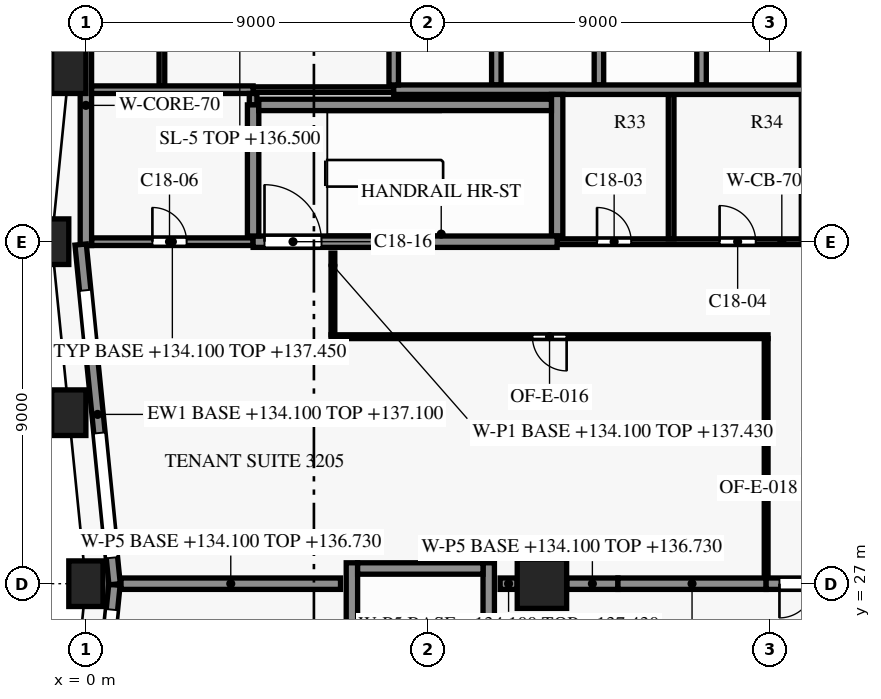
"""IFC4 building model, lengths in metres.
Left out: names, types, materials, properties, quantities, classifications, styles, units other than length and angle.
Written with IfcOpenShell. Run it as: python <this file> out.ifc"""

import sys

from ifc_helpers import new_model, si_unit, direction, frame, frame_2d, origin, origin_2d, place, context, subcontext, project, spatial, rectangle, extrude, element, fill, save


model = new_model("IFC4")
c1 = context("Model", 3, precision=1e-05, world=origin(), true_north=direction((0.0, 1.0)))
c2 = subcontext(c1, "Body", "Model", "MODEL_VIEW")
j1 = project(units=[si_unit("LENGTHUNIT", "METRE"), si_unit("PLANEANGLEUNIT", "RADIAN")], contexts=[c1])
p1 = place(None, origin())
s1 = spatial("IfcSite", under=j1, at=p1, CompositionType="ELEMENT")
p2 = place(p1, origin())
s2 = spatial("IfcBuilding", under=s1, at=p2, CompositionType="ELEMENT")
p3 = place(p2, frame((0.0, 0.0, 134.1)))
s3 = spatial("IfcBuildingStorey", under=s2, at=p3, CompositionType="ELEMENT", Elevation=134.1)
for number, where, z_axis, x_axis in (
    (1, (-0.45, 40.5, 0.0), (0.0, 0.0, 1.0), (-0.1, -0.995, 0.0)),
    (2, (-0.9, 36.0, 0.0), (0.0, 0.0, 1.0), (0.0, -1.0, 0.0)),
    (3, (-0.45, 31.5, 0.0), (0.0, 0.0, 1.0), (0.1, -0.995, 0.0)),
    (4, (0.0, 27.0, 0.0), (0.0, 0.0, 1.0), (0.0, -1.0, 0.0)),
):
    element("IfcColumn", number, at=place(p3, frame(where, z_axis=z_axis, x_axis=x_axis)), inside=s3, PredefinedType="COLUMN", context=c2, shape_type="SweptSolid", body=[
        extrude(rectangle(XDim=0.9, YDim=1.2, at=origin_2d()), origin(), (0.0, 0.0, 1.0), 3.8),
    ])
p4 = place(p3, frame((12.0, 27.0, 0.0), z_axis=(0.0, 0.0, 1.0), x_axis=(1.0, 0.0, 0.0)))
e5 = element("IfcColumn", 5, at=p4, inside=s3, PredefinedType="COLUMN", context=c2, shape_type="SweptSolid", body=[
    extrude(rectangle(XDim=1.3, YDim=1.3, at=origin_2d()), origin(), (0.0, 0.0, 1.0), 3.8),
])
p5 = place(p3, frame((0.755, 26.985, 0.0), z_axis=(0.0, 0.0, 1.0), x_axis=(-0.099479505633, 0.995039611251, 0.0)))
e6 = element("IfcWall", 6, at=p5, inside=s3, PredefinedType="SOLIDWALL", context=c2, shape_type="SweptSolid", body=[
    extrude(rectangle(XDim=8.985, YDim=0.3, at=frame_2d((4.492, 0.0))), origin(), (0.0, 0.0, 1.0), 3.0),
])
p6 = place(p5, frame((0.701, 0.0, 0.15)))
e7 = element("IfcOpeningElement", 7, at=p6, cuts=e6, PredefinedType="OPENING", context=c2, shape_type="SweptSolid", body=[
    extrude(rectangle(XDim=3.3, YDim=2.4, at=frame_2d((1.65, 1.2))), frame((0.0, 0.16, 0.0), z_axis=(0.0, -1.0, 0.0), x_axis=(1.0, 0.0, 0.0)), (0.0, 0.0, 1.0), 0.32),
])
p7 = place(p5, frame((5.974, 0.0, 0.75)))
e8 = element("IfcOpeningElement", 8, at=p7, cuts=e6, PredefinedType="OPENING", context=c2, shape_type="SweptSolid", body=[
    extrude(rectangle(XDim=1.8, YDim=1.8, at=frame_2d((0.9, 0.9))), frame((0.0, 0.16, 0.0), z_axis=(0.0, -1.0, 0.0), x_axis=(1.0, 0.0, 0.0)), (0.0, 0.0, 1.0), 0.32),
])
p8 = place(p3, frame((-0.148, 17.985, 0.0), z_axis=(0.0, 0.0, 1.0), x_axis=(0.099495688264, 0.995037993253, 0.0)))
e9 = element("IfcWall", 9, at=p8, inside=s3, PredefinedType="SOLIDWALL", context=c2, shape_type="SweptSolid", body=[
    extrude(rectangle(XDim=9.03, YDim=0.3, at=frame_2d((4.515, 0.0))), origin(), (0.0, 0.0, 1.0), 3.0),
])
p9 = place(p8, frame((1.301, 0.0, 0.75)))
e10 = element("IfcOpeningElement", 10, at=p9, cuts=e9, PredefinedType="OPENING", context=c2, shape_type="SweptSolid", body=[
    extrude(rectangle(XDim=1.8, YDim=1.8, at=frame_2d((0.9, 0.9))), frame((0.0, 0.16, 0.0), z_axis=(0.0, -1.0, 0.0), x_axis=(1.0, 0.0, 0.0)), (0.0, 0.0, 1.0), 0.32),
])
p10 = place(p8, frame((5.073, 0.0, 0.15)))
e11 = element("IfcOpeningElement", 11, at=p10, cuts=e9, PredefinedType="OPENING", context=c2, shape_type="SweptSolid", body=[
    extrude(rectangle(XDim=3.3, YDim=2.4, at=frame_2d((1.65, 1.2))), frame((0.0, 0.16, 0.0), z_axis=(0.0, -1.0, 0.0), x_axis=(1.0, 0.0, 0.0)), (0.0, 0.0, 1.0), 0.32),
])
p11 = place(p3, frame((7.15, 27.4, 0.0), z_axis=(0.0, 0.0, 1.0), x_axis=(1.0, 0.0, 0.0)))
e12 = element("IfcWall", 12, at=p11, inside=s3, PredefinedType="SHEAR", context=c2, shape_type="SweptSolid", body=[
    extrude(rectangle(XDim=3.3, YDim=0.3, at=frame_2d((1.65, 0.0))), origin(), (0.0, 0.0, 1.0), 3.5),
])
p12 = place(p3, frame((12.4, 36.0, 0.0), z_axis=(0.0, 0.0, 1.0), x_axis=(1.0, 0.0, 0.0)))
e13 = element("IfcWall", 13, at=p12, inside=s3, PredefinedType="SHEAR", context=c2, shape_type="SweptSolid", body=[
    extrude(rectangle(XDim=11.825, YDim=0.15, at=frame_2d((5.913, 0.0))), origin(), (0.0, 0.0, 1.0), 3.5),
])
p13 = place(p12, frame((1.05, 0.0, 0.0)))
e14 = element("IfcOpeningElement", 14, at=p13, cuts=e13, PredefinedType="OPENING", context=c2, shape_type="SweptSolid", body=[
    extrude(rectangle(XDim=0.9, YDim=2.1, at=frame_2d((0.45, 1.05))), frame((0.0, 0.085, 0.0), z_axis=(0.0, -1.0, 0.0), x_axis=(1.0, 0.0, 0.0)), (0.0, 0.0, 1.0), 0.17),
])
p14 = place(p12, frame((4.275, 0.0, 0.0)))
e15 = element("IfcOpeningElement", 15, at=p14, cuts=e13, PredefinedType="OPENING", context=c2, shape_type="SweptSolid", body=[
    extrude(rectangle(XDim=0.95, YDim=2.1, at=frame_2d((0.475, 1.05))), frame((0.0, 0.085, 0.0), z_axis=(0.0, -1.0, 0.0), x_axis=(1.0, 0.0, 0.0)), (0.0, 0.0, 1.0), 0.17),
])
p15 = place(p12, frame((8.75, 0.0, 0.0)))
e16 = element("IfcOpeningElement", 16, at=p15, cuts=e13, PredefinedType="OPENING", context=c2, shape_type="SweptSolid", body=[
    extrude(rectangle(XDim=0.9, YDim=2.1, at=frame_2d((0.45, 1.05))), frame((0.0, 0.085, 0.0), z_axis=(0.0, -1.0, 0.0), x_axis=(1.0, 0.0, 0.0)), (0.0, 0.0, 1.0), 0.17),
])
p16 = place(p3, frame((0.15, 36.0, 0.0), z_axis=(0.0, 0.0, 1.0), x_axis=(1.0, 0.0, 0.0)))
e17 = element("IfcWall", 17, at=p16, inside=s3, PredefinedType="PARTITIONING", context=c2, shape_type="SweptSolid", body=[
    extrude(rectangle(XDim=4.25, YDim=0.2, at=frame_2d((2.125, 0.0))), origin(), (0.0, 0.0, 1.0), 3.35),
])
p17 = place(p16, frame((1.6, 0.0, 0.0)))
e18 = element("IfcOpeningElement", 18, at=p17, cuts=e17, PredefinedType="OPENING", context=c2, shape_type="SweptSolid", body=[
    extrude(rectangle(XDim=0.9, YDim=2.1, at=frame_2d((0.45, 1.05))), frame((0.0, 0.11, 0.0), z_axis=(0.0, -1.0, 0.0), x_axis=(1.0, 0.0, 0.0)), (0.0, 0.0, 1.0), 0.22),
])
p18 = place(p3, frame((4.4, 36.0, 0.0), z_axis=(0.0, 0.0, 1.0), x_axis=(1.0, 0.0, 0.0)))
e19 = element("IfcWall", 19, at=p18, inside=s3, PredefinedType="SHEAR", context=c2, shape_type="SweptSolid", body=[
    extrude(rectangle(XDim=8.0, YDim=0.3, at=frame_2d((4.0, 0.0))), origin(), (0.0, 0.0, 1.0), 3.5),
])
p19 = place(p18, frame((0.3, 0.0, 0.0)))
e20 = element("IfcOpeningElement", 20, at=p19, cuts=e19, PredefinedType="OPENING", context=c2, shape_type="SweptSolid", body=[
    extrude(rectangle(XDim=1.5, YDim=2.2, at=frame_2d((0.75, 1.1))), frame((0.0, 0.16, 0.0), z_axis=(0.0, -1.0, 0.0), x_axis=(1.0, 0.0, 0.0)), (0.0, 0.0, 1.0), 0.32),
])
p20 = place(p3, frame((4.55, 39.6, 0.0), z_axis=(0.0, 0.0, 1.0), x_axis=(1.0, 0.0, 0.0)))
e21 = element("IfcWall", 21, at=p20, inside=s3, PredefinedType="SHEAR", context=c2, shape_type="SweptSolid", body=[
    extrude(rectangle(XDim=7.7, YDim=0.3, at=frame_2d((3.85, 0.0))), origin(), (0.0, 0.0, 1.0), 3.5),
])
p21 = place(p3, frame((4.4, 40.0, 0.0), z_axis=(0.0, 0.0, 1.0), x_axis=(1.0, 0.0, 0.0)))
e22 = element("IfcWall", 22, at=p21, inside=s3, PredefinedType="PARTITIONING", context=c2, shape_type="SweptSolid", body=[
    extrude(rectangle(XDim=3.7, YDim=0.15, at=frame_2d((1.85, 0.0))), origin(), (0.0, 0.0, 1.0), 3.35),
])
p22 = place(p3, frame((0.15, 40.0, 0.0), z_axis=(0.0, 0.0, 1.0), x_axis=(1.0, 0.0, 0.0)))
e23 = element("IfcWall", 23, at=p22, inside=s3, PredefinedType="PARTITIONING", context=c2, shape_type="SweptSolid", body=[
    extrude(rectangle(XDim=4.25, YDim=0.2, at=frame_2d((2.125, 0.0))), origin(), (0.0, 0.0, 1.0), 3.35),
])
p23 = place(p3, frame((8.1, 40.0, 0.0), z_axis=(0.0, 0.0, 1.0), x_axis=(1.0, 0.0, 0.0)))
e24 = element("IfcWall", 24, at=p23, inside=s3, PredefinedType="SHEAR", context=c2, shape_type="SweptSolid", body=[
    extrude(rectangle(XDim=13.5, YDim=0.25, at=frame_2d((6.75, 0.0))), origin(), (0.0, 0.0, 1.0), 3.5),
])
p24 = place(p3, frame((0.0, 35.9, 0.0), z_axis=(0.0, 0.0, 1.0), x_axis=(0.0, 1.0, 0.0)))
e25 = element("IfcWall", 25, at=p24, inside=s3, PredefinedType="SHEAR", context=c2, shape_type="SweptSolid", body=[
    extrude(rectangle(XDim=7.375, YDim=0.3, at=frame_2d((3.688, 0.0))), origin(), (0.0, 0.0, 1.0), 3.5),
])
p25 = place(p3, frame((2.0, 40.1, 0.0), z_axis=(0.0, 0.0, 1.0), x_axis=(0.0, 1.0, 0.0)))
e26 = element("IfcWall", 26, at=p25, inside=s3, PredefinedType="PARTITIONING", context=c2, shape_type="SweptSolid", body=[
    extrude(rectangle(XDim=3.025, YDim=0.15, at=frame_2d((1.512, 0.0))), origin(), (0.0, 0.0, 1.0), 3.35),
])
p26 = place(p3, frame((4.4, 39.6, 0.0), z_axis=(0.0, 0.0, 1.0), x_axis=(0.0, 1.0, 0.0)))
e27 = element("IfcWall", 27, at=p26, inside=s3, PredefinedType="PARTITIONING", context=c2, shape_type="SweptSolid", body=[
    extrude(rectangle(XDim=0.3, YDim=0.2, at=frame_2d((0.15, 0.0))), origin(), (0.0, 0.0, 1.0), 3.35),
])
p27 = place(p3, frame((4.4, 36.15, 0.0), z_axis=(0.0, 0.0, 1.0), x_axis=(0.0, 1.0, 0.0)))
e28 = element("IfcWall", 28, at=p27, inside=s3, PredefinedType="SHEAR", context=c2, shape_type="SweptSolid", body=[
    extrude(rectangle(XDim=3.45, YDim=0.3, at=frame_2d((1.725, 0.0))), origin(), (0.0, 0.0, 1.0), 3.5),
])
p28 = place(p3, frame((7.0, 19.25, 0.0), z_axis=(0.0, 0.0, 1.0), x_axis=(0.0, 1.0, 0.0)))
e29 = element("IfcWall", 29, at=p28, inside=s3, PredefinedType="SHEAR", context=c2, shape_type="SweptSolid", body=[
    extrude(rectangle(XDim=8.3, YDim=0.3, at=frame_2d((4.15, 0.0))), origin(), (0.0, 0.0, 1.0), 3.5),
])
p29 = place(p3, frame((8.1, 40.125, 0.0), z_axis=(0.0, 0.0, 1.0), x_axis=(0.0, 1.0, 0.0)))
e30 = element("IfcWall", 30, at=p29, inside=s3, PredefinedType="SHEAR", context=c2, shape_type="SweptSolid", body=[
    extrude(rectangle(XDim=2.95, YDim=0.25, at=frame_2d((1.475, 0.0))), origin(), (0.0, 0.0, 1.0), 3.5),
])
p30 = place(p3, frame((10.6, 19.25, 0.0), z_axis=(0.0, 0.0, 1.0), x_axis=(0.0, 1.0, 0.0)))
e31 = element("IfcWall", 31, at=p30, inside=s3, PredefinedType="SHEAR", context=c2, shape_type="SweptSolid", body=[
    extrude(rectangle(XDim=8.3, YDim=0.3, at=frame_2d((4.15, 0.0))), origin(), (0.0, 0.0, 1.0), 3.5),
])
p31 = place(p30, frame((0.55, 0.0, 0.0)))
e32 = element("IfcOpeningElement", 32, at=p31, cuts=e31, PredefinedType="OPENING", context=c2, shape_type="SweptSolid", body=[
    extrude(rectangle(XDim=1.2, YDim=2.2, at=frame_2d((0.6, 1.1))), frame((0.0, 0.16, 0.0), z_axis=(0.0, -1.0, 0.0), x_axis=(1.0, 0.0, 0.0)), (0.0, 0.0, 1.0), 0.32),
])
p32 = place(p3, frame((10.8, 40.125, 0.0), z_axis=(0.0, 0.0, 1.0), x_axis=(0.0, 1.0, 0.0)))
e33 = element("IfcWall", 33, at=p32, inside=s3, PredefinedType="SHEAR", context=c2, shape_type="SweptSolid", body=[
    extrude(rectangle(XDim=2.95, YDim=0.25, at=frame_2d((1.475, 0.0))), origin(), (0.0, 0.0, 1.0), 3.5),
])
p33 = place(p3, frame((12.4, 36.15, 0.0), z_axis=(0.0, 0.0, 1.0), x_axis=(0.0, 1.0, 0.0)))
e34 = element("IfcWall", 34, at=p33, inside=s3, PredefinedType="SHEAR", context=c2, shape_type="SweptSolid", body=[
    extrude(rectangle(XDim=3.725, YDim=0.3, at=frame_2d((1.863, 0.0))), origin(), (0.0, 0.0, 1.0), 3.5),
])
p34 = place(p3, frame((13.5, 40.125, 0.0), z_axis=(0.0, 0.0, 1.0), x_axis=(0.0, 1.0, 0.0)))
e35 = element("IfcWall", 35, at=p34, inside=s3, PredefinedType="SHEAR", context=c2, shape_type="SweptSolid", body=[
    extrude(rectangle(XDim=2.95, YDim=0.25, at=frame_2d((1.475, 0.0))), origin(), (0.0, 0.0, 1.0), 3.5),
])
p35 = place(p3, frame((15.4, 36.075, 0.0), z_axis=(0.0, 0.0, 1.0), x_axis=(0.0, 1.0, 0.0)))
e36 = element("IfcWall", 36, at=p35, inside=s3, PredefinedType="PARTITIONING", context=c2, shape_type="SweptSolid", body=[
    extrude(rectangle(XDim=3.8, YDim=0.15, at=frame_2d((1.9, 0.0))), origin(), (0.0, 0.0, 1.0), 3.35),
])
for number, where, z_axis, x_axis in (
    (37, (16.2, 40.125, 0.0), (0.0, 0.0, 1.0), (0.0, 1.0, 0.0)),
    (38, (18.9, 40.125, 0.0), (0.0, 0.0, 1.0), (0.0, 1.0, 0.0)),
):
    element("IfcWall", number, at=place(p3, frame(where, z_axis=z_axis, x_axis=x_axis)), inside=s3, PredefinedType="SHEAR", context=c2, shape_type="SweptSolid", body=[
        extrude(rectangle(XDim=2.95, YDim=0.25, at=frame_2d((1.475, 0.0))), origin(), (0.0, 0.0, 1.0), 3.5),
    ])
p36 = place(p3, frame((0.925, 27.0, 0.0), z_axis=(0.0, 0.0, 1.0), x_axis=(1.0, 0.0, 0.0)))
e39 = element("IfcWall", 39, at=p36, inside=s3, PredefinedType="PARTITIONING", context=c2, shape_type="SweptSolid", body=[
    extrude(rectangle(XDim=5.775, YDim=0.3, at=frame_2d((2.888, 0.0))), origin(), (0.0, 0.0, 1.0), 2.63),
])
p37 = place(p3, frame((10.9, 27.0, 0.0), z_axis=(0.0, 0.0, 1.0), x_axis=(1.0, 0.0, 0.0)))
e40 = element("IfcWall", 40, at=p37, inside=s3, PredefinedType="PARTITIONING", context=c2, shape_type="SweptSolid", body=[
    extrude(rectangle(XDim=0.445, YDim=0.3, at=frame_2d((0.223, 0.0))), origin(), (0.0, 0.0, 1.0), 3.33),
])
p38 = place(p3, frame((12.655, 27.0, 0.0), z_axis=(0.0, 0.0, 1.0), x_axis=(1.0, 0.0, 0.0)))
e41 = element("IfcWall", 41, at=p38, inside=s3, PredefinedType="PARTITIONING", context=c2, shape_type="SweptSolid", body=[
    extrude(rectangle(XDim=1.345, YDim=0.3, at=frame_2d((0.672, 0.0))), origin(), (0.0, 0.0, 1.0), 2.63),
])
p39 = place(p3, frame((14.0, 27.0, 0.0), z_axis=(0.0, 0.0, 1.0), x_axis=(1.0, 0.0, 0.0)))
e42 = element("IfcWall", 42, at=p39, inside=s3, PredefinedType="PARTITIONING", context=c2, shape_type="SweptSolid", body=[
    extrude(rectangle(XDim=3.9, YDim=0.3, at=frame_2d((1.95, 0.0))), origin(), (0.0, 0.0, 1.0), 2.63),
])
p40 = place(p3, frame((20.4, 27.0, 0.0), z_axis=(0.0, 0.0, 1.0), x_axis=(-1.0, 0.0, 0.0)))
e43 = element("IfcWall", 43, at=p40, inside=s3, PredefinedType="PARTITIONING", context=c2, shape_type="SweptSolid", body=[
    extrude(rectangle(XDim=2.5, YDim=0.3, at=frame_2d((1.25, 0.0))), origin(), (0.0, 0.0, 1.0), 2.63),
])
p41 = place(p40, frame((0.35, 0.0, 0.0)))
e44 = element("IfcOpeningElement", 44, at=p41, cuts=e43, PredefinedType="OPENING", context=c2, shape_type="SweptSolid", body=[
    extrude(rectangle(XDim=1.8, YDim=2.1, at=frame_2d((0.9, 1.05))), frame((0.0, 0.16, 0.0), z_axis=(0.0, -1.0, 0.0), x_axis=(1.0, 0.0, 0.0)), (0.0, 0.0, 1.0), 0.32),
])
p42 = place(p3, frame((17.9, 27.17, 0.0), z_axis=(0.0, 0.0, 1.0), x_axis=(0.0, 1.0, 0.0)))
e45 = element("IfcWall", 45, at=p42, inside=s3, PredefinedType="PARTITIONING", context=c2, shape_type="SweptSolid", body=[
    extrude(rectangle(XDim=6.28, YDim=0.1, at=frame_2d((3.14, 0.0))), origin(), (0.0, 0.0, 1.0), 2.63),
])
p43 = place(p3, frame((17.95, 33.5, 0.0), z_axis=(0.0, 0.0, 1.0), x_axis=(-1.0, 0.0, 0.0)))
e46 = element("IfcWall", 46, at=p43, inside=s3, PredefinedType="PARTITIONING", context=c2, shape_type="SweptSolid", body=[
    extrude(rectangle(XDim=11.5, YDim=0.1, at=frame_2d((5.75, 0.0))), origin(), (0.0, 0.0, 1.0), 2.63),
])
p44 = place(p43, frame((5.3, 0.0, 0.0)))
e47 = element("IfcOpeningElement", 47, at=p44, cuts=e46, PredefinedType="OPENING", context=c2, shape_type="SweptSolid", body=[
    extrude(rectangle(XDim=0.9, YDim=2.1, at=frame_2d((0.45, 1.05))), frame((0.0, 0.06, 0.0), z_axis=(0.0, -1.0, 0.0), x_axis=(1.0, 0.0, 0.0)), (0.0, 0.0, 1.0), 0.12),
])
p45 = place(p3, frame((6.5, 33.55, 0.0), z_axis=(0.0, 0.0, 1.0), x_axis=(0.0, 1.0, 0.0)))
e48 = element("IfcWall", 48, at=p45, inside=s3, PredefinedType="PARTITIONING", context=c2, shape_type="SweptSolid", body=[
    extrude(rectangle(XDim=2.15, YDim=0.1, at=frame_2d((1.075, 0.0))), origin(), (0.0, 0.0, 1.0), 3.33),
])
p46 = place(p6, origin())
e49 = element("IfcWindow", 49, at=p46, inside=s3, PartitioningType="SINGLE_PANEL", PredefinedType="WINDOW", context=c2, shape_type="SweptSolid", body=[
    extrude(rectangle(XDim=3.3, YDim=2.4, at=frame_2d((1.65, 1.2))), frame((0.0, 0.03, 0.0), z_axis=(0.0, -1.0, 0.0), x_axis=(1.0, 0.0, 0.0)), (0.0, 0.0, 1.0), 0.06),
])
fill(e7, e49)
p47 = place(p7, origin())
e50 = element("IfcWindow", 50, at=p47, inside=s3, PartitioningType="SINGLE_PANEL", PredefinedType="WINDOW", context=c2, shape_type="SweptSolid", body=[
    extrude(rectangle(XDim=1.8, YDim=1.8, at=frame_2d((0.9, 0.9))), frame((0.0, 0.03, 0.0), z_axis=(0.0, -1.0, 0.0), x_axis=(1.0, 0.0, 0.0)), (0.0, 0.0, 1.0), 0.06),
])
fill(e8, e50)
p48 = place(p10, origin())
e51 = element("IfcWindow", 51, at=p48, inside=s3, PartitioningType="SINGLE_PANEL", PredefinedType="WINDOW", context=c2, shape_type="SweptSolid", body=[
    extrude(rectangle(XDim=3.3, YDim=2.4, at=frame_2d((1.65, 1.2))), frame((0.0, 0.03, 0.0), z_axis=(0.0, -1.0, 0.0), x_axis=(1.0, 0.0, 0.0)), (0.0, 0.0, 1.0), 0.06),
])
fill(e11, e51)
p49 = place(p13, origin())
e52 = element("IfcDoor", 52, at=p49, inside=s3, OperationType="SINGLE_SWING_RIGHT", PredefinedType="DOOR", context=c2, shape_type="SweptSolid", body=[
    extrude(rectangle(XDim=0.9, YDim=2.1, at=frame_2d((0.45, 1.05))), frame((0.0, 0.025, 0.0), z_axis=(0.0, -1.0, 0.0), x_axis=(1.0, 0.0, 0.0)), (0.0, 0.0, 1.0), 0.05),
])
fill(e14, e52)
p50 = place(p14, origin())
e53 = element("IfcDoor", 53, at=p50, inside=s3, OperationType="SINGLE_SWING_LEFT", PredefinedType="DOOR", context=c2, shape_type="SweptSolid", body=[
    extrude(rectangle(XDim=0.95, YDim=2.1, at=frame_2d((0.475, 1.05))), frame((0.0, 0.025, 0.0), z_axis=(0.0, -1.0, 0.0), x_axis=(1.0, 0.0, 0.0)), (0.0, 0.0, 1.0), 0.05),
])
fill(e15, e53)
p51 = place(p17, origin())
e54 = element("IfcDoor", 54, at=p51, inside=s3, OperationType="SINGLE_SWING_LEFT", PredefinedType="DOOR", context=c2, shape_type="SweptSolid", body=[
    extrude(rectangle(XDim=0.9, YDim=2.1, at=frame_2d((0.45, 1.05))), frame((0.0, 0.025, 0.0), z_axis=(0.0, -1.0, 0.0), x_axis=(1.0, 0.0, 0.0)), (0.0, 0.0, 1.0), 0.05),
])
fill(e18, e54)
p52 = place(p19, origin())
e55 = element("IfcDoor", 55, at=p52, inside=s3, OperationType="SINGLE_SWING_RIGHT", PredefinedType="DOOR", context=c2, shape_type="SweptSolid", body=[
    extrude(rectangle(XDim=1.5, YDim=2.2, at=frame_2d((0.75, 1.1))), frame((0.0, 0.025, 0.0), z_axis=(0.0, -1.0, 0.0), x_axis=(1.0, 0.0, 0.0)), (0.0, 0.0, 1.0), 0.05),
])
fill(e20, e55)
p53 = place(p44, origin())
e56 = element("IfcDoor", 56, at=p53, inside=s3, OperationType="SINGLE_SWING_LEFT", PredefinedType="DOOR", context=c2, shape_type="SweptSolid", body=[
    extrude(rectangle(XDim=0.9, YDim=2.1, at=frame_2d((0.45, 1.05))), frame((0.0, 0.025, 0.0), z_axis=(0.0, -1.0, 0.0), x_axis=(1.0, 0.0, 0.0)), (0.0, 0.0, 1.0), 0.05),
])
fill(e47, e56)
p54 = place(p41, origin())
e57 = element("IfcDoor", 57, at=p54, inside=s3, OperationType="DOUBLE_DOOR_SINGLE_SWING", PredefinedType="DOOR", context=c2, shape_type="SweptSolid", body=[
    extrude(rectangle(XDim=1.8, YDim=2.1, at=frame_2d((0.9, 1.05))), frame((0.0, 0.025, 0.0), z_axis=(0.0, -1.0, 0.0), x_axis=(1.0, 0.0, 0.0)), (0.0, 0.0, 1.0), 0.05),
])
fill(e44, e57)
save(model, sys.argv[1])
